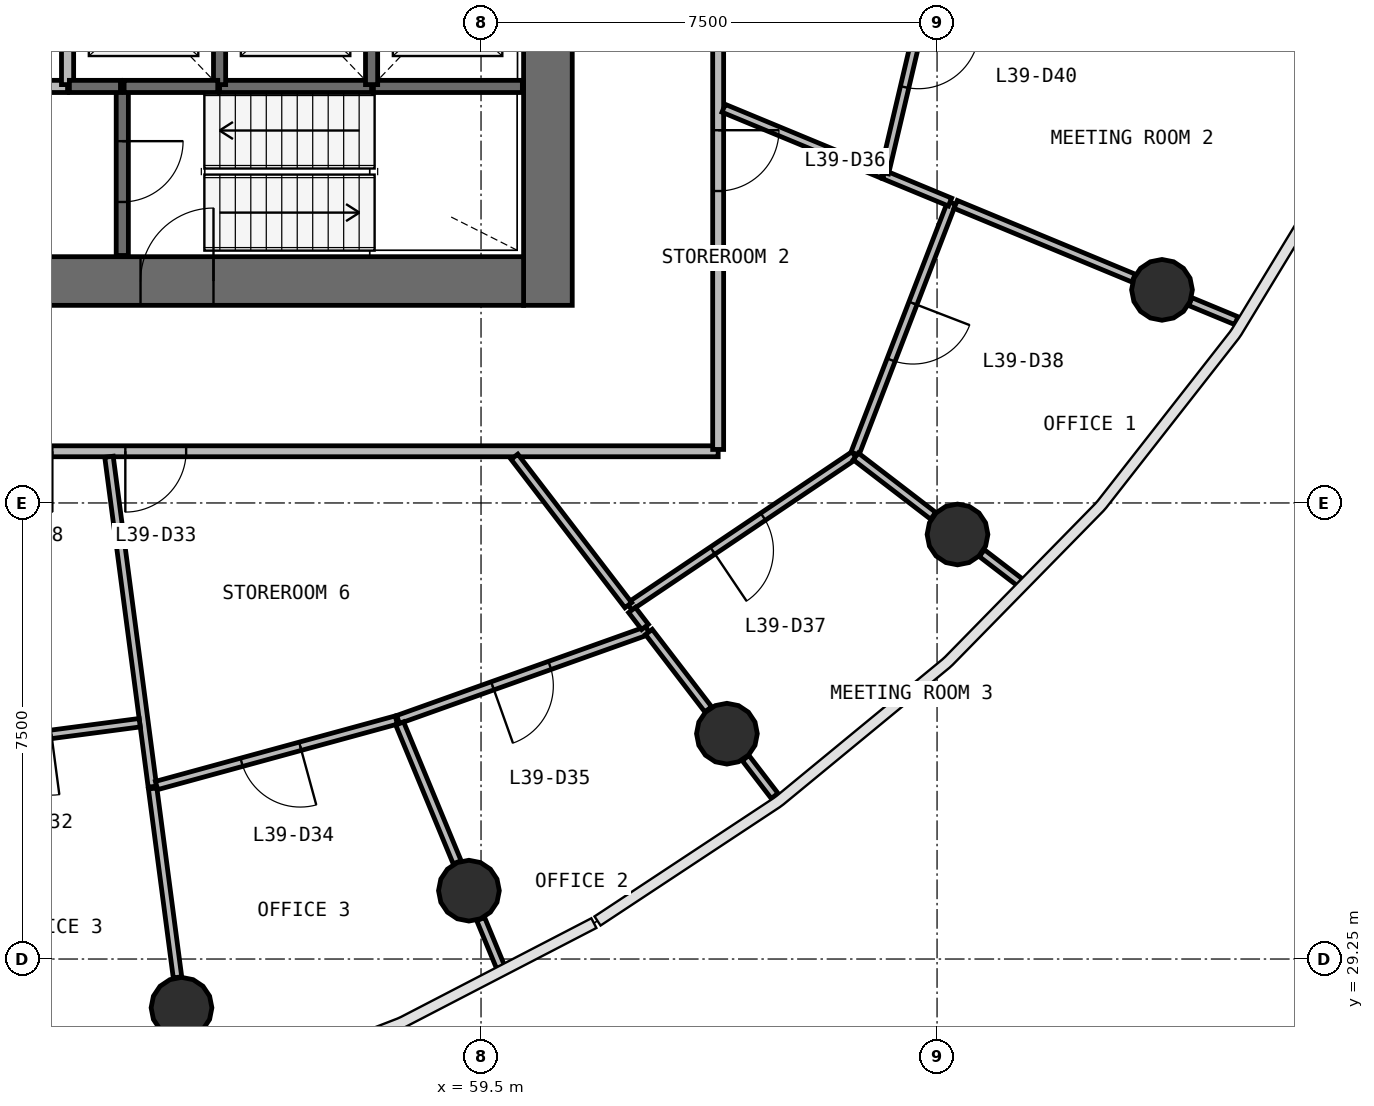
"""IFC4 building model, lengths in metres.
Left out: names, types, materials, properties, quantities, classifications, styles, units other than length and angle.
Written with IfcOpenShell. Run it as: python <this file> out.ifc"""

import sys

from ifc_helpers import new_model, si_unit, direction, frame, frame_2d, origin, origin_2d, place, context, subcontext, project, spatial, rectangle, circle, extrude, source, transform, mapped, element, fill, save


model = new_model("IFC4")
c1 = context("Model", 3, precision=1e-05, world=origin(), true_north=direction((0.0, 1.0)))
c2 = subcontext(c1, "Body", "Model", "MODEL_VIEW")
j1 = project(units=[si_unit("LENGTHUNIT", "METRE"), si_unit("PLANEANGLEUNIT", "RADIAN")], contexts=[c1])
p1 = place(None, origin())
s1 = spatial("IfcSite", under=j1, at=p1, CompositionType="ELEMENT")
p2 = place(p1, origin())
s2 = spatial("IfcBuilding", under=s1, at=p2, CompositionType="ELEMENT")
p3 = place(p2, frame((0.0, 0.0, 164.3)))
s3 = spatial("IfcBuildingStorey", under=s2, at=p3, CompositionType="ELEMENT", Elevation=164.3)
p4 = place(p3, frame((60.6, 40.0, 0.0), z_axis=(0.0, 0.0, 1.0), x_axis=(0.0, 1.0, 0.0)))
e1 = element("IfcWall", 1, at=p4, inside=s3, PredefinedType="SHEAR", context=c2, shape_type="SweptSolid", body=[
    extrude(rectangle(XDim=16.0, YDim=0.8, at=frame_2d((8.0, 0.0))), origin(), (0.0, 0.0, 1.0), 3.9),
])
p5 = place(p4, frame((7.1, 0.0, 0.0)))
e2 = element("IfcOpeningElement", 2, at=p5, cuts=e1, PredefinedType="OPENING", context=c2, shape_type="SweptSolid", body=[
    extrude(rectangle(XDim=1.8, YDim=2.1, at=frame_2d((0.9, 1.05))), frame((0.0, 0.41, 0.0), z_axis=(0.0, -1.0, 0.0), x_axis=(1.0, 0.0, 0.0)), (0.0, 0.0, 1.0), 0.82),
])
p6 = place(p3, frame((43.8, 40.4, 0.0), z_axis=(0.0, 0.0, 1.0), x_axis=(1.0, 0.0, 0.0)))
e3 = element("IfcWall", 3, at=p6, inside=s3, PredefinedType="SHEAR", context=c2, shape_type="SweptSolid", body=[
    extrude(rectangle(XDim=16.4, YDim=0.8, at=frame_2d((8.2, 0.0))), origin(), (0.0, 0.0, 1.0), 3.9),
])
p7 = place(p6, frame((10.1, 0.0, 0.0)))
e4 = element("IfcOpeningElement", 4, at=p7, cuts=e3, PredefinedType="OPENING", context=c2, shape_type="SweptSolid", body=[
    extrude(rectangle(XDim=1.2, YDim=2.1, at=frame_2d((0.6, 1.05))), frame((0.0, 0.41, 0.0), z_axis=(0.0, -1.0, 0.0), x_axis=(1.0, 0.0, 0.0)), (0.0, 0.0, 1.0), 0.82),
])
p8 = place(p6, frame((7.05, 0.0, 0.0)))
e5 = element("IfcOpeningElement", 5, at=p8, cuts=e3, PredefinedType="OPENING", context=c2, shape_type="SweptSolid", body=[
    extrude(rectangle(XDim=1.1, YDim=2.1, at=frame_2d((0.55, 1.05))), frame((0.0, 0.41, 0.0), z_axis=(0.0, -1.0, 0.0), x_axis=(1.0, 0.0, 0.0)), (0.0, 0.0, 1.0), 0.82),
])
p9 = place(p6, frame((0.5, 0.0, 0.0)))
e6 = element("IfcOpeningElement", 6, at=p9, cuts=e3, PredefinedType="OPENING", context=c2, shape_type="SweptSolid", body=[
    extrude(rectangle(XDim=0.8, YDim=2.1, at=frame_2d((0.4, 1.05))), frame((0.0, 0.41, 0.0), z_axis=(0.0, -1.0, 0.0), x_axis=(1.0, 0.0, 0.0)), (0.0, 0.0, 1.0), 0.82),
])
m1 = source(origin(), c2, "Body", "SweptSolid", [
    extrude(circle(Radius=0.5, at=origin_2d()), origin(), (0.0, 0.0, 1.0), 3.9),
])
for number, where, z_axis, x_axis in (
    (7, (54.574, 28.449, 0.0), (0.0, 0.0, 1.0), (1.0, 0.0, 0.0)),
    (8, (59.301, 30.374, 0.0), (0.0, 0.0, 1.0), (1.0, 0.0, 0.0)),
    (9, (63.544, 32.956, 0.0), (0.0, 0.0, 1.0), (1.0, 0.0, 0.0)),
    (10, (67.336, 36.232, 0.0), (0.0, 0.0, 1.0), (1.0, 0.0, 0.0)),
    (11, (70.699, 40.254, 0.0), (0.0, 0.0, 1.0), (1.0, 0.0, 0.0)),
):
    element("IfcColumn", number, at=place(p3, frame(where, z_axis=z_axis, x_axis=x_axis)), inside=s3, PredefinedType="COLUMN", context=c2, shape_type="MappedRepresentation", body=[
        mapped(m1, transform((0.0, 0.0, 0.0), scale=1.0)),
    ])
p10 = place(p3, frame((52.7, 43.6, 0.0), z_axis=(0.0, 0.0, 1.0), x_axis=(-1.0, 0.0, 0.0)))
e12 = element("IfcWall", 12, at=p10, inside=s3, PredefinedType="SOLIDWALL", context=c2, shape_type="SweptSolid", body=[
    extrude(rectangle(XDim=4.8, YDim=0.2, at=frame_2d((2.4, 0.0))), origin(), (0.0, 0.0, 1.0), 3.58),
])
p11 = place(p3, frame((53.6, 43.6, 0.0), z_axis=(0.0, 0.0, 1.0), x_axis=(0.0, -1.0, 0.0)))
e13 = element("IfcWall", 13, at=p11, inside=s3, PredefinedType="SOLIDWALL", context=c2, shape_type="SweptSolid", body=[
    extrude(rectangle(XDim=2.78, YDim=0.2, at=frame_2d((1.39, 0.0))), origin(), (0.0, 0.0, 1.0), 3.58),
])
p12 = place(p11, frame((0.9, 0.0, 0.0)))
e14 = element("IfcOpeningElement", 14, at=p12, cuts=e13, PredefinedType="OPENING", context=c2, shape_type="SweptSolid", body=[
    extrude(rectangle(XDim=1.0, YDim=2.1, at=frame_2d((0.5, 1.05))), frame((0.0, 0.11, 0.0), z_axis=(0.0, -1.0, 0.0), x_axis=(1.0, 0.0, 0.0)), (0.0, 0.0, 1.0), 0.22),
])
p13 = place(p3, frame((55.2, 43.6, 0.0), z_axis=(0.0, 0.0, 1.0), x_axis=(1.0, 0.0, 0.0)))
e15 = element("IfcWall", 15, at=p13, inside=s3, PredefinedType="SOLIDWALL", context=c2, shape_type="SweptSolid", body=[
    extrude(rectangle(XDim=2.5, YDim=0.2, at=frame_2d((1.25, 0.0))), origin(), (0.0, 0.0, 1.0), 3.58),
])
p14 = place(p3, frame((57.73, 43.6, 0.0), z_axis=(0.0, 0.0, 1.0), x_axis=(1.0, 0.0, 0.0)))
e16 = element("IfcWall", 16, at=p14, inside=s3, PredefinedType="SOLIDWALL", context=c2, shape_type="SweptSolid", body=[
    extrude(rectangle(XDim=2.45, YDim=0.2, at=frame_2d((1.225, 0.0))), origin(), (0.0, 0.0, 1.0), 3.58),
])
for number, where, z_axis, x_axis in (
    (17, (52.7, 45.99, 0.0), (0.0, 0.0, 1.0), (0.0, -1.0, 0.0)),
    (18, (55.2, 43.63, 0.0), (0.0, 0.0, 1.0), (0.0, 1.0, 0.0)),
    (19, (57.7, 43.63, 0.0), (0.0, 0.0, 1.0), (0.0, 1.0, 0.0)),
):
    element("IfcWall", number, at=place(p3, frame(where, z_axis=z_axis, x_axis=x_axis)), inside=s3, PredefinedType="SOLIDWALL", context=c2, shape_type="SweptSolid", body=[
        extrude(rectangle(XDim=2.36, YDim=0.2, at=frame_2d((1.18, 0.0))), origin(), (0.0, 0.0, 1.0), 3.58),
    ])
p15 = place(p3, frame((53.63, 43.6, 0.0), z_axis=(0.0, 0.0, 1.0), x_axis=(1.0, 0.0, 0.0)))
e20 = element("IfcWall", 20, at=p15, inside=s3, PredefinedType="SOLIDWALL", context=c2, shape_type="SweptSolid", body=[
    extrude(rectangle(XDim=1.54, YDim=0.2, at=frame_2d((0.77, 0.0))), origin(), (0.0, 0.0, 1.0), 3.58),
])
p16 = place(p3, frame((52.73, 43.6, 0.0), z_axis=(0.0, 0.0, 1.0), x_axis=(1.0, 0.0, 0.0)))
e21 = element("IfcWall", 21, at=p16, inside=s3, PredefinedType="SOLIDWALL", context=c2, shape_type="SweptSolid", body=[
    extrude(rectangle(XDim=0.84, YDim=0.2, at=frame_2d((0.42, 0.0))), origin(), (0.0, 0.0, 1.0), 3.58),
])
p17 = place(p3, frame((63.4, 37.6, 0.0), z_axis=(0.0, 0.0, 1.0), x_axis=(-1.0, 0.0, 0.0)))
e22 = element("IfcWall", 22, at=p17, inside=s3, PredefinedType="PARTITIONING", context=c2, shape_type="SweptSolid", body=[
    extrude(rectangle(XDim=22.8, YDim=0.18, at=frame_2d((11.4, 0.0))), origin(), (0.0, 0.0, 1.0), 2.88),
])
p18 = place(p17, frame((10.95, 0.0, 0.0)))
e23 = element("IfcOpeningElement", 23, at=p18, cuts=e22, PredefinedType="OPENING", context=c2, shape_type="SweptSolid", body=[
    extrude(rectangle(XDim=1.0, YDim=2.1, at=frame_2d((0.5, 1.05))), frame((0.0, 0.1, 0.0), z_axis=(0.0, -1.0, 0.0), x_axis=(1.0, 0.0, 0.0)), (0.0, 0.0, 1.0), 0.2),
])
p19 = place(p17, frame((8.75, 0.0, 0.0)))
e24 = element("IfcOpeningElement", 24, at=p19, cuts=e22, PredefinedType="OPENING", context=c2, shape_type="SweptSolid", body=[
    extrude(rectangle(XDim=1.0, YDim=2.1, at=frame_2d((0.5, 1.05))), frame((0.0, 0.1, 0.0), z_axis=(0.0, -1.0, 0.0), x_axis=(1.0, 0.0, 0.0)), (0.0, 0.0, 1.0), 0.2),
])
p20 = place(p3, frame((63.4, 58.37, 0.0), z_axis=(0.0, 0.0, 1.0), x_axis=(0.0, -1.0, 0.0)))
e25 = element("IfcWall", 25, at=p20, inside=s3, PredefinedType="PARTITIONING", context=c2, shape_type="SweptSolid", body=[
    extrude(rectangle(XDim=20.74, YDim=0.18, at=frame_2d((10.37, 0.0))), origin(), (0.0, 0.0, 1.0), 2.88),
])
p21 = place(p20, frame((15.49, 0.0, 0.0)))
e26 = element("IfcOpeningElement", 26, at=p21, cuts=e25, PredefinedType="OPENING", context=c2, shape_type="SweptSolid", body=[
    extrude(rectangle(XDim=1.0, YDim=2.1, at=frame_2d((0.5, 1.05))), frame((0.0, 0.1, 0.0), z_axis=(0.0, -1.0, 0.0), x_axis=(1.0, 0.0, 0.0)), (0.0, 0.0, 1.0), 0.2),
])
p22 = place(p20, frame((9.89, 0.0, 0.0)))
e27 = element("IfcOpeningElement", 27, at=p22, cuts=e25, PredefinedType="OPENING", context=c2, shape_type="SweptSolid", body=[
    extrude(rectangle(XDim=1.0, YDim=2.1, at=frame_2d((0.5, 1.05))), frame((0.0, 0.1, 0.0), z_axis=(0.0, -1.0, 0.0), x_axis=(1.0, 0.0, 0.0)), (0.0, 0.0, 1.0), 0.2),
])
p23 = place(p20, frame((7.69, 0.0, 0.0)))
e28 = element("IfcOpeningElement", 28, at=p23, cuts=e25, PredefinedType="OPENING", context=c2, shape_type="SweptSolid", body=[
    extrude(rectangle(XDim=1.0, YDim=2.1, at=frame_2d((0.5, 1.05))), frame((0.0, 0.1, 0.0), z_axis=(0.0, -1.0, 0.0), x_axis=(1.0, 0.0, 0.0)), (0.0, 0.0, 1.0), 0.2),
])
p24 = place(p3, frame((53.381, 37.51, 0.0), z_axis=(0.0, 0.0, 1.0), x_axis=(0.130500676988, -0.991448220184, 0.0)))
e29 = element("IfcWall", 29, at=p24, inside=s3, PredefinedType="PARTITIONING", context=c2, shape_type="SweptSolid", body=[
    extrude(rectangle(XDim=5.472, YDim=0.14, at=frame_2d((2.736, 0.0))), origin(), (0.0, 0.0, 1.0), 2.88),
])
p25 = place(p3, frame((65.639, 37.534, 0.0), z_axis=(0.0, 0.0, 1.0), x_axis=(-0.829726260186, -0.558170523368, 0.0)))
e30 = element("IfcWall", 30, at=p25, inside=s3, PredefinedType="PARTITIONING", context=c2, shape_type="SweptSolid", body=[
    extrude(rectangle(XDim=4.458, YDim=0.14, at=frame_2d((2.229, 0.0))), origin(), (0.0, 0.0, 1.0), 2.88),
])
p26 = place(p25, frame((1.808, 0.0, 0.0)))
e31 = element("IfcOpeningElement", 31, at=p26, cuts=e30, PredefinedType="OPENING", context=c2, shape_type="SweptSolid", body=[
    extrude(rectangle(XDim=1.0, YDim=2.1, at=frame_2d((0.5, 1.05))), frame((0.0, 0.08, 0.0), z_axis=(0.0, -1.0, 0.0), x_axis=(1.0, 0.0, 0.0)), (0.0, 0.0, 1.0), 0.16),
])
p27 = place(p3, frame((67.241, 41.687, 0.0), z_axis=(0.0, 0.0, 1.0), x_axis=(-0.359870694831, -0.933002188101, 0.0)))
e32 = element("IfcWall", 32, at=p27, inside=s3, PredefinedType="PARTITIONING", context=c2, shape_type="SweptSolid", body=[
    extrude(rectangle(XDim=4.421, YDim=0.14, at=frame_2d((2.21, 0.0))), origin(), (0.0, 0.0, 1.0), 2.88),
])
p28 = place(p27, frame((1.771, 0.0, 0.0)))
e33 = element("IfcOpeningElement", 33, at=p28, cuts=e32, PredefinedType="OPENING", context=c2, shape_type="SweptSolid", body=[
    extrude(rectangle(XDim=1.0, YDim=2.1, at=frame_2d((0.5, 1.05))), frame((0.0, 0.08, 0.0), z_axis=(0.0, -1.0, 0.0), x_axis=(1.0, 0.0, 0.0)), (0.0, 0.0, 1.0), 0.16),
])
p29 = place(p3, frame((66.127, 42.148, 0.0), z_axis=(0.0, 0.0, 1.0), x_axis=(0.923940913117, -0.382535212848, 0.0)))
e34 = element("IfcWall", 34, at=p29, inside=s3, PredefinedType="PARTITIONING", context=c2, shape_type="SweptSolid", body=[
    extrude(rectangle(XDim=1.176, YDim=0.14, at=frame_2d((0.588, 0.0))), origin(), (0.0, 0.0, 1.0), 2.88),
])
p30 = place(p3, frame((67.306, 41.66, 0.0), z_axis=(0.0, 0.0, 1.0), x_axis=(0.923868420414, -0.38271025824, 0.0)))
e35 = element("IfcWall", 35, at=p30, inside=s3, PredefinedType="PARTITIONING", context=c2, shape_type="SweptSolid", body=[
    extrude(rectangle(XDim=3.168, YDim=0.14, at=frame_2d((1.584, 0.0))), origin(), (0.0, 0.0, 1.0), 2.88),
])
p31 = place(p3, frame((62.242, 34.653, 0.0), z_axis=(0.0, 0.0, 1.0), x_axis=(-0.94188625398, -0.335931964187, 0.0)))
e36 = element("IfcWall", 36, at=p31, inside=s3, PredefinedType="PARTITIONING", context=c2, shape_type="SweptSolid", body=[
    extrude(rectangle(XDim=4.36, YDim=0.14, at=frame_2d((2.18, 0.0))), origin(), (0.0, 0.0, 1.0), 2.88),
])
p32 = place(p31, frame((1.71, 0.0, 0.0)))
e37 = element("IfcOpeningElement", 37, at=p32, cuts=e36, PredefinedType="OPENING", context=c2, shape_type="SweptSolid", body=[
    extrude(rectangle(XDim=1.0, YDim=2.1, at=frame_2d((0.5, 1.05))), frame((0.0, 0.08, 0.0), z_axis=(0.0, -1.0, 0.0), x_axis=(1.0, 0.0, 0.0)), (0.0, 0.0, 1.0), 0.16),
])
p33 = place(p3, frame((54.099, 32.055, 0.0), z_axis=(0.0, 0.0, 1.0), x_axis=(0.130525064179, -0.991445009883, 0.0)))
e38 = element("IfcWall", 38, at=p33, inside=s3, PredefinedType="PARTITIONING", context=c2, shape_type="SweptSolid", body=[
    extrude(rectangle(XDim=3.133, YDim=0.14, at=frame_2d((1.566, 0.0))), origin(), (0.0, 0.0, 1.0), 2.88),
])
p34 = place(p3, frame((58.106, 33.18, 0.0), z_axis=(0.0, 0.0, 1.0), x_axis=(-0.96465070337, -0.263531820636, 0.0)))
e39 = element("IfcWall", 39, at=p34, inside=s3, PredefinedType="PARTITIONING", context=c2, shape_type="SweptSolid", body=[
    extrude(rectangle(XDim=4.087, YDim=0.14, at=frame_2d((2.044, 0.0))), origin(), (0.0, 0.0, 1.0), 2.88),
])
p35 = place(p34, frame((1.637, 0.0, 0.0)))
e40 = element("IfcOpeningElement", 40, at=p35, cuts=e39, PredefinedType="OPENING", context=c2, shape_type="SweptSolid", body=[
    extrude(rectangle(XDim=1.0, YDim=2.1, at=frame_2d((0.5, 1.05))), frame((0.0, 0.08, 0.0), z_axis=(0.0, -1.0, 0.0), x_axis=(1.0, 0.0, 0.0)), (0.0, 0.0, 1.0), 0.16),
])
p36 = place(p3, frame((63.49, 43.241, 0.0), z_axis=(0.0, 0.0, 1.0), x_axis=(0.92389569038, -0.38264442149, 0.0)))
e41 = element("IfcWall", 41, at=p36, inside=s3, PredefinedType="PARTITIONING", context=c2, shape_type="SweptSolid", body=[
    extrude(rectangle(XDim=2.824, YDim=0.14, at=frame_2d((1.412, 0.0))), origin(), (0.0, 0.0, 1.0), 2.88),
])
p37 = place(p3, frame((53.886, 33.136, 0.0), z_axis=(0.0, 0.0, 1.0), x_axis=(-0.991436881293, -0.130586792642, 0.0)))
e42 = element("IfcWall", 42, at=p37, inside=s3, PredefinedType="PARTITIONING", context=c2, shape_type="SweptSolid", body=[
    extrude(rectangle(XDim=3.915, YDim=0.14, at=frame_2d((1.958, 0.0))), origin(), (0.0, 0.0, 1.0), 2.88),
])
p38 = place(p37, frame((1.465, 0.0, 0.0)))
e43 = element("IfcOpeningElement", 43, at=p38, cuts=e42, PredefinedType="OPENING", context=c2, shape_type="SweptSolid", body=[
    extrude(rectangle(XDim=1.0, YDim=2.1, at=frame_2d((0.5, 1.05))), frame((0.0, 0.08, 0.0), z_axis=(0.0, -1.0, 0.0), x_axis=(1.0, 0.0, 0.0)), (0.0, 0.0, 1.0), 0.16),
])
p39 = place(p3, frame((67.032, 45.991, 0.0), z_axis=(0.0, 0.0, 1.0), x_axis=(-0.229140061488, -0.973393462183, 0.0)))
e44 = element("IfcWall", 44, at=p39, inside=s3, PredefinedType="PARTITIONING", context=c2, shape_type="SweptSolid", body=[
    extrude(rectangle(XDim=3.918, YDim=0.14, at=frame_2d((1.959, 0.0))), origin(), (0.0, 0.0, 1.0), 2.88),
])
p40 = place(p39, frame((1.468, 0.0, 0.0)))
e45 = element("IfcOpeningElement", 45, at=p40, cuts=e44, PredefinedType="OPENING", context=c2, shape_type="SweptSolid", body=[
    extrude(rectangle(XDim=1.0, YDim=2.1, at=frame_2d((0.5, 1.05))), frame((0.0, 0.08, 0.0), z_axis=(0.0, -1.0, 0.0), x_axis=(1.0, 0.0, 0.0)), (0.0, 0.0, 1.0), 0.16),
])
p41 = place(p3, frame((60.049, 37.51, 0.0), z_axis=(0.0, 0.0, 1.0), x_axis=(0.608763032439, -0.793352109933, 0.0)))
e46 = element("IfcWall", 46, at=p41, inside=s3, PredefinedType="PARTITIONING", context=c2, shape_type="SweptSolid", body=[
    extrude(rectangle(XDim=3.076, YDim=0.14, at=frame_2d((1.538, 0.0))), origin(), (0.0, 0.0, 1.0), 2.88),
])
p42 = place(p3, frame((58.162, 33.124, 0.0), z_axis=(0.0, 0.0, 1.0), x_axis=(0.382692135528, -0.923875927495, 0.0)))
e47 = element("IfcWall", 47, at=p42, inside=s3, PredefinedType="PARTITIONING", context=c2, shape_type="SweptSolid", body=[
    extrude(rectangle(XDim=2.471, YDim=0.14, at=frame_2d((1.235, 0.0))), origin(), (0.0, 0.0, 1.0), 2.88),
])
p43 = place(p3, frame((62.26, 34.629, 0.0), z_axis=(0.0, 0.0, 1.0), x_axis=(0.608629524716, -0.793454536596, 0.0)))
e48 = element("IfcWall", 48, at=p43, inside=s3, PredefinedType="PARTITIONING", context=c2, shape_type="SweptSolid", body=[
    extrude(rectangle(XDim=1.605, YDim=0.14, at=frame_2d((0.802, 0.0))), origin(), (0.0, 0.0, 1.0), 2.88),
])
p44 = place(p3, frame((65.663, 37.516, 0.0), z_axis=(0.0, 0.0, 1.0), x_axis=(0.793341796664, -0.608776472661, 0.0)))
e49 = element("IfcWall", 49, at=p44, inside=s3, PredefinedType="PARTITIONING", context=c2, shape_type="SweptSolid", body=[
    extrude(rectangle(XDim=1.604, YDim=0.14, at=frame_2d((0.802, 0.0))), origin(), (0.0, 0.0, 1.0), 2.88),
])
p45 = place(p3, frame((59.494, 29.908, 0.0), z_axis=(0.0, 0.0, 1.0), x_axis=(0.38261179702, -0.923909201589, 0.0)))
e50 = element("IfcWall", 50, at=p45, inside=s3, PredefinedType="PARTITIONING", context=c2, shape_type="SweptSolid", body=[
    extrude(rectangle(XDim=0.857, YDim=0.14, at=frame_2d((0.428, 0.0))), origin(), (0.0, 0.0, 1.0), 2.88),
])
p46 = place(p3, frame((71.166, 40.061, 0.0), z_axis=(0.0, 0.0, 1.0), x_axis=(0.923798714545, -0.382878485951, 0.0)))
e51 = element("IfcWall", 51, at=p46, inside=s3, PredefinedType="PARTITIONING", context=c2, shape_type="SweptSolid", body=[
    extrude(rectangle(XDim=0.819, YDim=0.14, at=frame_2d((0.409, 0.0))), origin(), (0.0, 0.0, 1.0), 2.88),
])
p47 = place(p3, frame((67.737, 35.925, 0.0), z_axis=(0.0, 0.0, 1.0), x_axis=(0.793295559338, -0.608836723215, 0.0)))
e52 = element("IfcWall", 52, at=p47, inside=s3, PredefinedType="PARTITIONING", context=c2, shape_type="SweptSolid", body=[
    extrude(rectangle(XDim=0.797, YDim=0.14, at=frame_2d((0.398, 0.0))), origin(), (0.0, 0.0, 1.0), 2.88),
])
p48 = place(p3, frame((63.851, 32.555, 0.0), z_axis=(0.0, 0.0, 1.0), x_axis=(0.60871867817, -0.793386142334, 0.0)))
e53 = element("IfcWall", 53, at=p48, inside=s3, PredefinedType="PARTITIONING", context=c2, shape_type="SweptSolid", body=[
    extrude(rectangle(XDim=0.785, YDim=0.14, at=frame_2d((0.393, 0.0))), origin(), (0.0, 0.0, 1.0), 2.88),
])
p49 = place(p3, frame((61.983, 34.99, 0.0), z_axis=(0.0, 0.0, 1.0), x_axis=(0.609072866583, -0.793114268686, 0.0)))
e54 = element("IfcWall", 54, at=p49, inside=s3, PredefinedType="PARTITIONING", context=c2, shape_type="SweptSolid", body=[
    extrude(rectangle(XDim=0.352, YDim=0.14, at=frame_2d((0.176, 0.0))), origin(), (0.0, 0.0, 1.0), 2.88),
])
m2 = source(origin(), c2, "Body", "SweptSolid", [
    extrude(rectangle(XDim=1.2, YDim=2.1, at=frame_2d((0.6, 1.05))), frame((0.0, 0.025, 0.0), z_axis=(0.0, -1.0, 0.0), x_axis=(1.0, 0.0, 0.0)), (0.0, 0.0, 1.0), 0.05),
])
p50 = place(p7, origin())
e55 = element("IfcDoor", 55, at=p50, inside=s3, OperationType="SINGLE_SWING_RIGHT", PredefinedType="DOOR", context=c2, shape_type="MappedRepresentation", body=[
    mapped(m2, transform((0.0, 0.0, 0.0), scale=1.0)),
])
fill(e4, e55)
m3 = source(origin(), c2, "Body", "SweptSolid", [
    extrude(rectangle(XDim=1.0, YDim=2.1, at=frame_2d((0.5, 1.05))), frame((0.0, 0.025, 0.0), z_axis=(0.0, -1.0, 0.0), x_axis=(1.0, 0.0, 0.0)), (0.0, 0.0, 1.0), 0.05),
])
p51 = place(p12, origin())
e56 = element("IfcDoor", 56, at=p51, inside=s3, OperationType="SINGLE_SWING_LEFT", PredefinedType="DOOR", context=c2, shape_type="MappedRepresentation", body=[
    mapped(m3, transform((0.0, 0.0, 0.0), scale=1.0)),
])
fill(e14, e56)
m4 = source(origin(), c2, "Body", "SweptSolid", [
    extrude(rectangle(XDim=1.0, YDim=2.1, at=frame_2d((0.5, 1.05))), frame((0.0, 0.025, 0.0), z_axis=(0.0, -1.0, 0.0), x_axis=(1.0, 0.0, 0.0)), (0.0, 0.0, 1.0), 0.05),
])
p52 = place(p19, origin())
e57 = element("IfcDoor", 57, at=p52, inside=s3, OperationType="SINGLE_SWING_RIGHT", PredefinedType="DOOR", context=c2, shape_type="MappedRepresentation", body=[
    mapped(m4, transform((0.0, 0.0, 0.0), scale=1.0)),
])
fill(e24, e57)
p53 = place(p35, origin())
e58 = element("IfcDoor", 58, at=p53, inside=s3, OperationType="SINGLE_SWING_LEFT", PredefinedType="DOOR", context=c2, shape_type="MappedRepresentation", body=[
    mapped(m4, transform((0.0, 0.0, 0.0), scale=1.0)),
])
fill(e40, e58)
p54 = place(p32, origin())
e59 = element("IfcDoor", 59, at=p54, inside=s3, OperationType="SINGLE_SWING_RIGHT", PredefinedType="DOOR", context=c2, shape_type="MappedRepresentation", body=[
    mapped(m4, transform((0.0, 0.0, 0.0), scale=1.0)),
])
fill(e37, e59)
p55 = place(p21, origin())
e60 = element("IfcDoor", 60, at=p55, inside=s3, OperationType="SINGLE_SWING_LEFT", PredefinedType="DOOR", context=c2, shape_type="MappedRepresentation", body=[
    mapped(m4, transform((0.0, 0.0, 0.0), scale=1.0)),
])
fill(e26, e60)
p56 = place(p26, origin())
e61 = element("IfcDoor", 61, at=p56, inside=s3, OperationType="SINGLE_SWING_RIGHT", PredefinedType="DOOR", context=c2, shape_type="MappedRepresentation", body=[
    mapped(m4, transform((0.0, 0.0, 0.0), scale=1.0)),
])
fill(e31, e61)
p57 = place(p28, origin())
e62 = element("IfcDoor", 62, at=p57, inside=s3, OperationType="SINGLE_SWING_LEFT", PredefinedType="DOOR", context=c2, shape_type="MappedRepresentation", body=[
    mapped(m4, transform((0.0, 0.0, 0.0), scale=1.0)),
])
fill(e33, e62)
p58 = place(p40, origin())
e63 = element("IfcDoor", 63, at=p58, inside=s3, OperationType="SINGLE_SWING_LEFT", PredefinedType="DOOR", context=c2, shape_type="MappedRepresentation", body=[
    mapped(m4, transform((0.0, 0.0, 0.0), scale=1.0)),
])
fill(e45, e63)
save(model, sys.argv[1])
